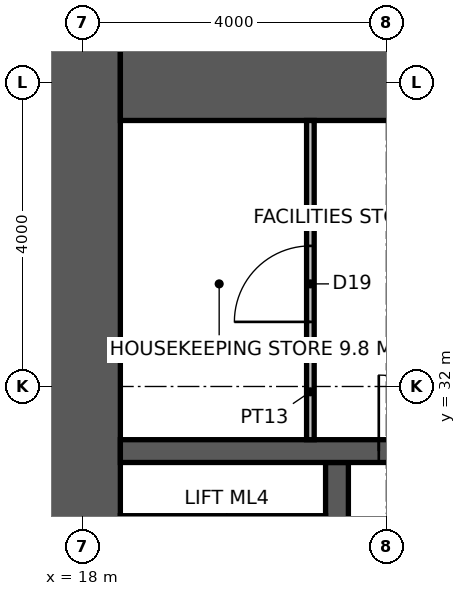
"""IFC4 building model, lengths in metres.
Left out: names, types, materials, properties, quantities, classifications, styles, units other than length and angle.
Written with IfcOpenShell. Run it as: python <this file> out.ifc"""

import sys

from ifc_helpers import new_model, si_unit, direction, frame, frame_2d, origin, place, context, subcontext, project, spatial, rectangle, extrude, element, fill, save


model = new_model("IFC4")
c1 = context("Model", 3, precision=1e-05, world=origin(), true_north=direction((0.0, 1.0)))
c2 = subcontext(c1, "Body", "Model", "MODEL_VIEW")
j1 = project(units=[si_unit("LENGTHUNIT", "METRE"), si_unit("PLANEANGLEUNIT", "RADIAN")], contexts=[c1])
p1 = place(None, origin())
s1 = spatial("IfcSite", under=j1, at=p1, CompositionType="ELEMENT")
p2 = place(p1, origin())
s2 = spatial("IfcBuilding", under=s1, at=p2, CompositionType="ELEMENT")
p3 = place(p2, frame((0.0, 0.0, 81.4)))
s3 = spatial("IfcBuildingStorey", under=s2, at=p3, CompositionType="ELEMENT", Elevation=81.4)
p4 = place(p3, frame((18.0, 17.5, -0.15), z_axis=(0.0, 0.0, 1.0), x_axis=(0.0, 1.0, 0.0)))
e1 = element("IfcWall", 1, at=p4, inside=s3, PredefinedType="SHEAR", context=c2, shape_type="SweptSolid", body=[
    extrude(rectangle(XDim=19.0, YDim=1.0, at=frame_2d((9.5, 0.0))), origin(), (0.0, 0.0, 1.0), 4.0),
])
p5 = place(p3, frame((18.5, 36.0, -0.15), z_axis=(0.0, 0.0, 1.0), x_axis=(1.0, 0.0, 0.0)))
e2 = element("IfcWall", 2, at=p5, inside=s3, PredefinedType="SHEAR", context=c2, shape_type="SweptSolid", body=[
    extrude(rectangle(XDim=17.6, YDim=1.0, at=frame_2d((8.8, 0.0))), origin(), (0.0, 0.0, 1.0), 4.0),
])
p6 = place(p3, frame((21.35, 18.5, -0.15), z_axis=(0.0, 0.0, 1.0), x_axis=(0.0, 1.0, 0.0)))
e3 = element("IfcWall", 3, at=p6, inside=s3, PredefinedType="SHEAR", context=c2, shape_type="SweptSolid", body=[
    extrude(rectangle(XDim=12.5, YDim=0.3, at=frame_2d((6.25, 0.0))), origin(), (0.0, 0.0, 1.0), 4.0),
])
p7 = place(p6, frame((0.875, 0.0, 0.15)))
e4 = element("IfcOpeningElement", 4, at=p7, cuts=e3, PredefinedType="OPENING", context=c2, shape_type="SweptSolid", body=[
    extrude(rectangle(XDim=1.1, YDim=2.2, at=frame_2d((0.55, 1.1))), frame((0.0, 0.16, 0.0), z_axis=(0.0, -1.0, 0.0), x_axis=(1.0, 0.0, 0.0)), (0.0, 0.0, 1.0), 0.32),
])
p8 = place(p6, frame((3.825, 0.0, 0.15)))
e5 = element("IfcOpeningElement", 5, at=p8, cuts=e3, PredefinedType="OPENING", context=c2, shape_type="SweptSolid", body=[
    extrude(rectangle(XDim=1.1, YDim=2.2, at=frame_2d((0.55, 1.1))), frame((0.0, 0.16, 0.0), z_axis=(0.0, -1.0, 0.0), x_axis=(1.0, 0.0, 0.0)), (0.0, 0.0, 1.0), 0.32),
])
p9 = place(p6, frame((6.675, 0.0, 0.15)))
e6 = element("IfcOpeningElement", 6, at=p9, cuts=e3, PredefinedType="OPENING", context=c2, shape_type="SweptSolid", body=[
    extrude(rectangle(XDim=1.1, YDim=2.2, at=frame_2d((0.55, 1.1))), frame((0.0, 0.16, 0.0), z_axis=(0.0, -1.0, 0.0), x_axis=(1.0, 0.0, 0.0)), (0.0, 0.0, 1.0), 0.32),
])
p10 = place(p6, frame((9.575, 0.0, 0.15)))
e7 = element("IfcOpeningElement", 7, at=p10, cuts=e3, PredefinedType="OPENING", context=c2, shape_type="SweptSolid", body=[
    extrude(rectangle(XDim=1.1, YDim=2.2, at=frame_2d((0.55, 1.1))), frame((0.0, 0.16, 0.0), z_axis=(0.0, -1.0, 0.0), x_axis=(1.0, 0.0, 0.0)), (0.0, 0.0, 1.0), 0.32),
])
p11 = place(p3, frame((18.5, 31.15, -0.15), z_axis=(0.0, 0.0, 1.0), x_axis=(1.0, 0.0, 0.0)))
e8 = element("IfcWall", 8, at=p11, inside=s3, PredefinedType="SHEAR", context=c2, shape_type="SweptSolid", body=[
    extrude(rectangle(XDim=5.35, YDim=0.3, at=frame_2d((2.675, 0.0))), origin(), (0.0, 0.0, 1.0), 4.0),
])
p12 = place(p11, frame((3.4, 0.0, 0.15)))
e9 = element("IfcOpeningElement", 9, at=p12, cuts=e8, PredefinedType="OPENING", context=c2, shape_type="SweptSolid", body=[
    extrude(rectangle(XDim=1.0, YDim=2.2, at=frame_2d((0.5, 1.1))), frame((0.0, 0.16, 0.0), z_axis=(0.0, -1.0, 0.0), x_axis=(1.0, 0.0, 0.0)), (0.0, 0.0, 1.0), 0.32),
])
p13 = place(p3, frame((21.0, 31.3, 0.0), z_axis=(0.0, 0.0, 1.0), x_axis=(0.0, 1.0, 0.0)))
e10 = element("IfcWall", 10, at=p13, inside=s3, PredefinedType="PARTITIONING", context=c2, shape_type="SweptSolid", body=[
    extrude(rectangle(XDim=4.2, YDim=0.1, at=frame_2d((2.1, 0.0))), origin(), (0.0, 0.0, 1.0), 3.85),
])
p14 = place(p13, frame((1.55, 0.0, 0.0)))
e11 = element("IfcOpeningElement", 11, at=p14, cuts=e10, PredefinedType="OPENING", context=c2, shape_type="SweptSolid", body=[
    extrude(rectangle(XDim=1.0, YDim=2.2, at=frame_2d((0.5, 1.1))), frame((0.0, 0.06, 0.0), z_axis=(0.0, -1.0, 0.0), x_axis=(1.0, 0.0, 0.0)), (0.0, 0.0, 1.0), 0.12),
])
p15 = place(p12, origin())
e12 = element("IfcDoor", 12, at=p15, inside=s3, OperationType="SINGLE_SWING_LEFT", PredefinedType="DOOR", context=c2, shape_type="SweptSolid", body=[
    extrude(rectangle(XDim=1.0, YDim=2.2, at=frame_2d((0.5, 1.1))), frame((0.0, 0.025, 0.0), z_axis=(0.0, -1.0, 0.0), x_axis=(1.0, 0.0, 0.0)), (0.0, 0.0, 1.0), 0.05),
])
fill(e9, e12)
p16 = place(p14, origin())
e13 = element("IfcDoor", 13, at=p16, inside=s3, OperationType="SINGLE_SWING_LEFT", PredefinedType="DOOR", context=c2, shape_type="SweptSolid", body=[
    extrude(rectangle(XDim=1.0, YDim=2.2, at=frame_2d((0.5, 1.1))), frame((0.0, 0.025, 0.0), z_axis=(0.0, -1.0, 0.0), x_axis=(1.0, 0.0, 0.0)), (0.0, 0.0, 1.0), 0.05),
])
fill(e11, e13)
save(model, sys.argv[1])
